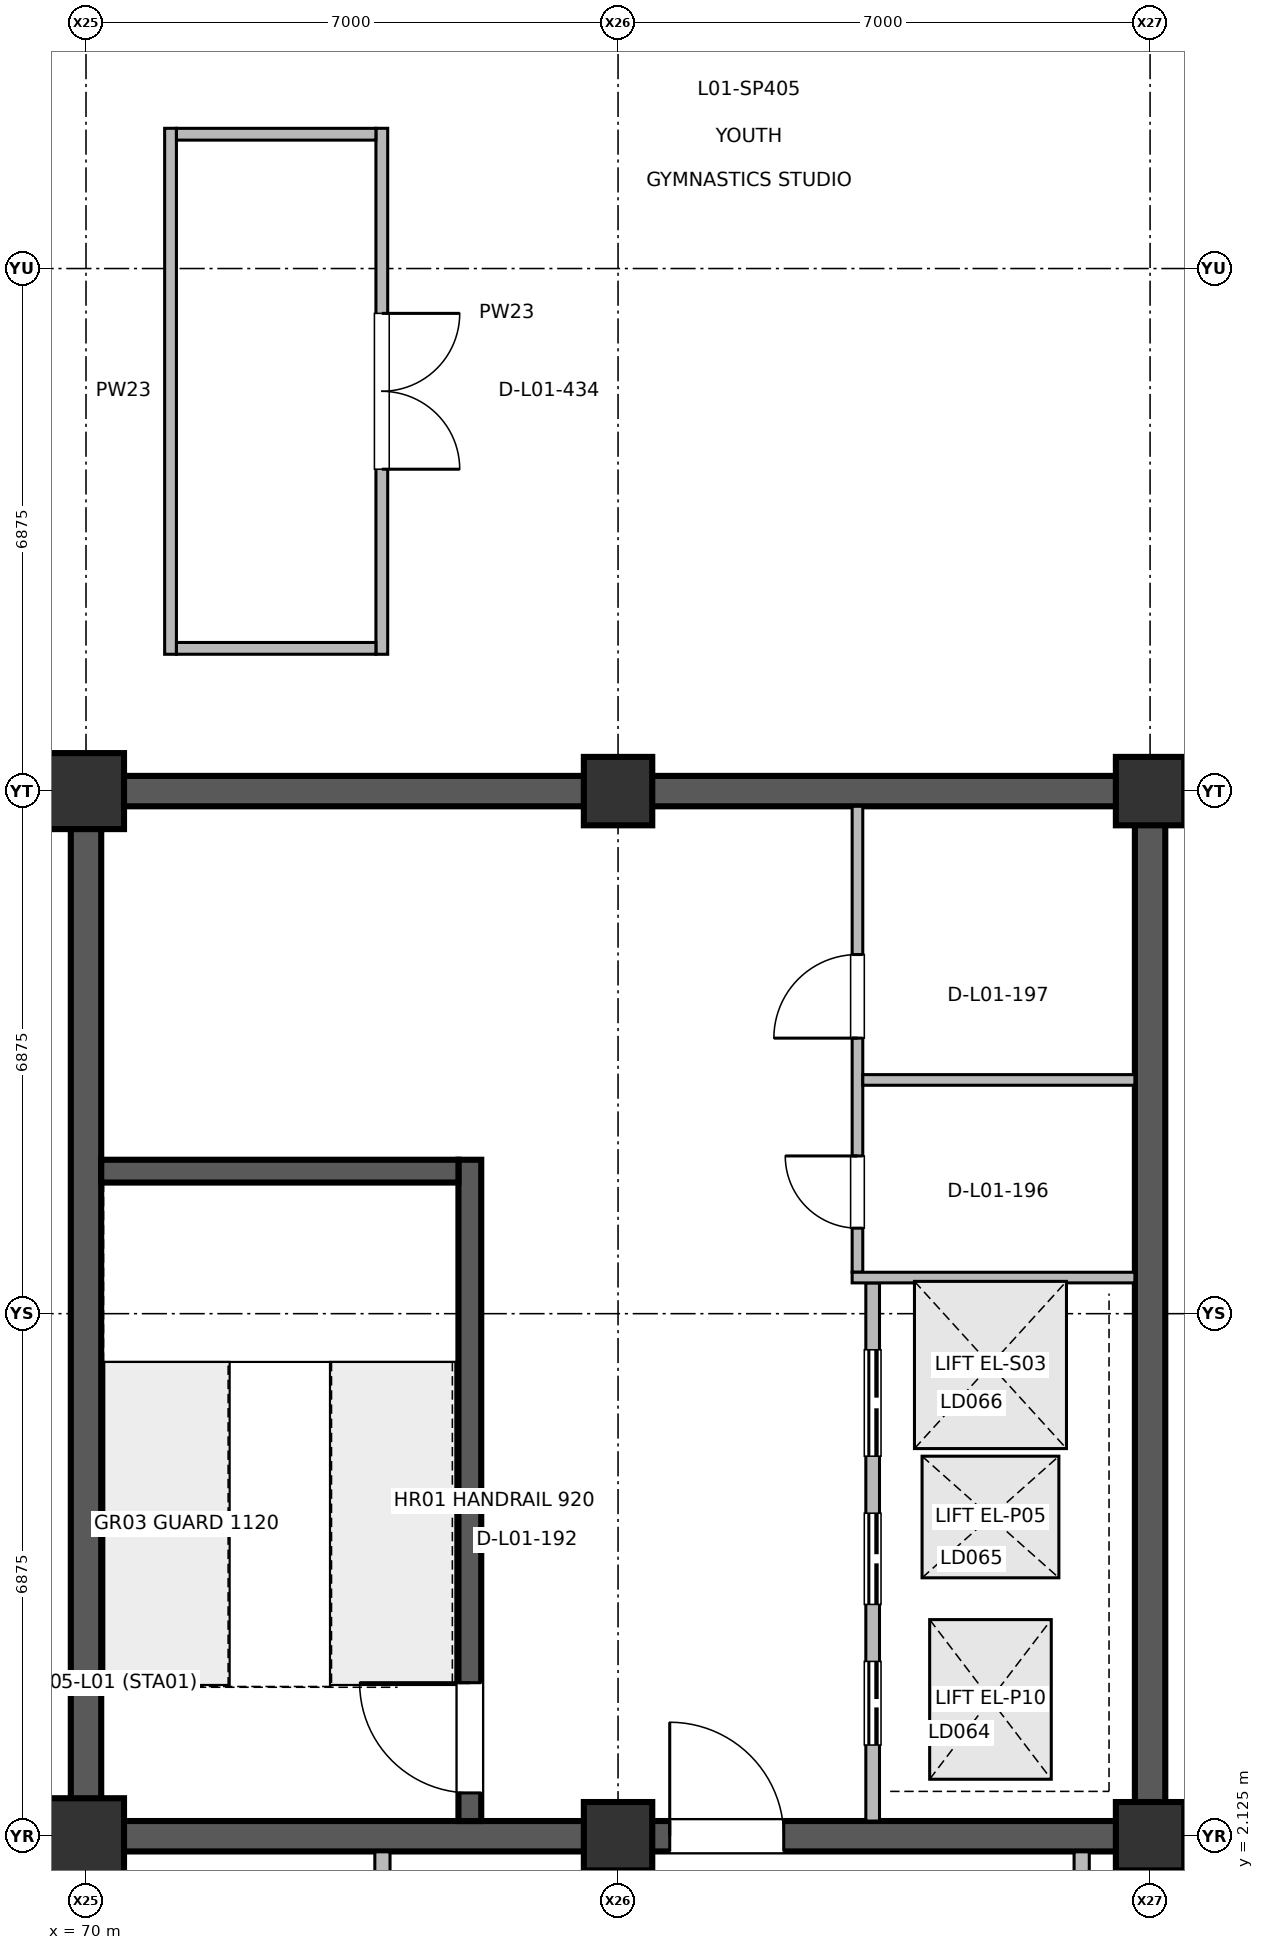
"""IFC4 building model, lengths in metres.
Left out: names, types, materials, properties, quantities, classifications, styles, units other than length and angle.
Written with IfcOpenShell. Run it as: python <this file> out.ifc"""

import sys

from ifc_helpers import new_model, si_unit, direction, frame, frame_2d, origin, origin_2d, place, context, subcontext, project, spatial, rectangle, extrude, element, fill, save


model = new_model("IFC4")
c1 = context("Model", 3, precision=1e-05, world=origin(), true_north=direction((0.0, 1.0)))
c2 = subcontext(c1, "Body", "Model", "MODEL_VIEW")
j1 = project(units=[si_unit("LENGTHUNIT", "METRE"), si_unit("PLANEANGLEUNIT", "RADIAN")], contexts=[c1])
p1 = place(None, origin())
s1 = spatial("IfcSite", under=j1, at=p1, CompositionType="ELEMENT")
p2 = place(p1, origin())
s2 = spatial("IfcBuilding", under=s1, at=p2, CompositionType="ELEMENT")
p3 = place(p2, origin())
s3 = spatial("IfcBuildingStorey", under=s2, at=p3, CompositionType="ELEMENT", Elevation=0.0)
for number, where, z_axis, x_axis in (
    (1, (70.0, 2.125, 0.0), (0.0, 0.0, 1.0), (1.0, 0.0, 0.0)),
    (2, (70.0, 15.875, 0.0), (0.0, 0.0, 1.0), (1.0, 0.0, 0.0)),
):
    element("IfcColumn", number, at=place(p3, frame(where, z_axis=z_axis, x_axis=x_axis)), inside=s3, PredefinedType="COLUMN", context=c2, shape_type="SweptSolid", body=[
        extrude(rectangle(XDim=1.0, YDim=1.0, at=origin_2d()), origin(), (0.0, 0.0, 1.0), 5.998),
    ])
for number, where, z_axis, x_axis in (
    (3, (77.0, 2.125, 0.0), (0.0, 0.0, 1.0), (1.0, 0.0, 0.0)),
    (4, (77.0, 15.875, 0.0), (0.0, 0.0, 1.0), (1.0, 0.0, 0.0)),
    (5, (84.0, 2.125, 0.0), (0.0, 0.0, 1.0), (1.0, 0.0, 0.0)),
    (6, (84.0, 15.875, 0.0), (0.0, 0.0, 1.0), (1.0, 0.0, 0.0)),
):
    element("IfcColumn", number, at=place(p3, frame(where, z_axis=z_axis, x_axis=x_axis)), inside=s3, PredefinedType="COLUMN", context=c2, shape_type="SweptSolid", body=[
        extrude(rectangle(XDim=0.9, YDim=0.9, at=origin_2d()), origin(), (0.0, 0.0, 1.0), 5.998),
    ])
for number, where, z_axis, x_axis in (
    (7, (70.0, 2.325, 0.0), (0.0, 0.0, 1.0), (0.0, 1.0, 0.0)),
    (8, (84.0, 2.325, 0.0), (0.0, 0.0, 1.0), (0.0, 1.0, 0.0)),
):
    element("IfcWall", number, at=place(p3, frame(where, z_axis=z_axis, x_axis=x_axis)), inside=s3, PredefinedType="SHEAR", context=c2, shape_type="SweptSolid", body=[
        extrude(rectangle(XDim=13.35, YDim=0.4, at=frame_2d((6.675, 0.0))), origin(), (0.0, 0.0, 1.0), 5.75),
    ])
p4 = place(p3, frame((70.2, 2.125, 0.0), z_axis=(0.0, 0.0, 1.0), x_axis=(1.0, 0.0, 0.0)))
e9 = element("IfcWall", 9, at=p4, inside=s3, PredefinedType="SHEAR", context=c2, shape_type="SweptSolid", body=[
    extrude(rectangle(XDim=13.6, YDim=0.4, at=frame_2d((6.8, 0.0))), origin(), (0.0, 0.0, 1.0), 5.75),
])
p5 = place(p4, frame((7.48, 0.0, 0.0)))
e10 = element("IfcOpeningElement", 10, at=p5, cuts=e9, PredefinedType="OPENING", context=c2, shape_type="SweptSolid", body=[
    extrude(rectangle(XDim=1.5, YDim=2.2, at=frame_2d((0.75, 1.1))), frame((0.0, 0.21, 0.0), z_axis=(0.0, -1.0, 0.0), x_axis=(1.0, 0.0, 0.0)), (0.0, 0.0, 1.0), 0.42),
])
p6 = place(p3, frame((70.2, 15.875, 0.0), z_axis=(0.0, 0.0, 1.0), x_axis=(1.0, 0.0, 0.0)))
e11 = element("IfcWall", 11, at=p6, inside=s3, PredefinedType="SHEAR", context=c2, shape_type="SweptSolid", body=[
    extrude(rectangle(XDim=13.6, YDim=0.4, at=frame_2d((6.8, 0.0))), origin(), (0.0, 0.0, 1.0), 5.75),
])
p7 = place(p3, frame((75.05, 2.325, 0.0), z_axis=(0.0, 0.0, 1.0), x_axis=(0.0, 1.0, 0.0)))
e12 = element("IfcWall", 12, at=p7, inside=s3, PredefinedType="SHEAR", context=c2, shape_type="SweptSolid", body=[
    extrude(rectangle(XDim=8.7, YDim=0.3, at=frame_2d((4.35, 0.0))), origin(), (0.0, 0.0, 1.0), 5.75),
])
p8 = place(p7, frame((0.37, 0.0, 0.0)))
e13 = element("IfcOpeningElement", 13, at=p8, cuts=e12, PredefinedType="OPENING", context=c2, shape_type="SweptSolid", body=[
    extrude(rectangle(XDim=1.45, YDim=2.2, at=frame_2d((0.725, 1.1))), frame((0.0, 0.16, 0.0), z_axis=(0.0, -1.0, 0.0), x_axis=(1.0, 0.0, 0.0)), (0.0, 0.0, 1.0), 0.32),
])
p9 = place(p3, frame((80.35, 2.325, 0.0), z_axis=(0.0, 0.0, 1.0), x_axis=(0.0, 1.0, 0.0)))
e14 = element("IfcWall", 14, at=p9, inside=s3, PredefinedType="PARTITIONING", context=c2, shape_type="SweptSolid", body=[
    extrude(rectangle(XDim=7.08, YDim=0.18, at=frame_2d((3.54, 0.0))), origin(), (0.0, 0.0, 1.0), 5.02),
])
p10 = place(p9, frame((1.0, 0.0, 0.0)))
e15 = element("IfcOpeningElement", 15, at=p10, cuts=e14, PredefinedType="OPENING", context=c2, shape_type="SweptSolid", body=[
    extrude(rectangle(XDim=1.1, YDim=2.2, at=frame_2d((0.55, 1.1))), frame((0.0, 0.1, 0.0), z_axis=(0.0, -1.0, 0.0), x_axis=(1.0, 0.0, 0.0)), (0.0, 0.0, 1.0), 0.2),
])
p11 = place(p9, frame((2.85, 0.0, 0.0)))
e16 = element("IfcOpeningElement", 16, at=p11, cuts=e14, PredefinedType="OPENING", context=c2, shape_type="SweptSolid", body=[
    extrude(rectangle(XDim=1.2, YDim=2.25, at=frame_2d((0.6, 1.125))), frame((0.0, 0.1, 0.0), z_axis=(0.0, -1.0, 0.0), x_axis=(1.0, 0.0, 0.0)), (0.0, 0.0, 1.0), 0.2),
])
p12 = place(p9, frame((4.8, 0.0, 0.0)))
e17 = element("IfcOpeningElement", 17, at=p12, cuts=e14, PredefinedType="OPENING", context=c2, shape_type="SweptSolid", body=[
    extrude(rectangle(XDim=1.4, YDim=2.3, at=frame_2d((0.7, 1.15))), frame((0.0, 0.1, 0.0), z_axis=(0.0, -1.0, 0.0), x_axis=(1.0, 0.0, 0.0)), (0.0, 0.0, 1.0), 0.2),
])
p13 = place(p3, frame((80.15, 9.545, 0.0), z_axis=(0.0, 0.0, 1.0), x_axis=(0.0, 1.0, 0.0)))
e18 = element("IfcWall", 18, at=p13, inside=s3, PredefinedType="PARTITIONING", context=c2, shape_type="SweptSolid", body=[
    extrude(rectangle(XDim=6.13, YDim=0.14, at=frame_2d((3.065, 0.0))), origin(), (0.0, 0.0, 1.0), 5.02),
])
p14 = place(p13, frame((0.58, 0.0, 0.0)))
e19 = element("IfcOpeningElement", 19, at=p14, cuts=e18, PredefinedType="OPENING", context=c2, shape_type="SweptSolid", body=[
    extrude(rectangle(XDim=0.95, YDim=2.15, at=frame_2d((0.475, 1.075))), frame((0.0, 0.08, 0.0), z_axis=(0.0, -1.0, 0.0), x_axis=(1.0, 0.0, 0.0)), (0.0, 0.0, 1.0), 0.16),
])
p15 = place(p13, frame((3.08, 0.0, 0.0)))
e20 = element("IfcOpeningElement", 20, at=p15, cuts=e18, PredefinedType="OPENING", context=c2, shape_type="SweptSolid", body=[
    extrude(rectangle(XDim=1.1, YDim=2.15, at=frame_2d((0.55, 1.075))), frame((0.0, 0.08, 0.0), z_axis=(0.0, -1.0, 0.0), x_axis=(1.0, 0.0, 0.0)), (0.0, 0.0, 1.0), 0.16),
])
p16 = place(p3, frame((73.892, 24.595, 0.0), z_axis=(0.0, 0.0, 1.0), x_axis=(0.0, -1.0, 0.0)))
e21 = element("IfcWall", 21, at=p16, inside=s3, PredefinedType="PARTITIONING", context=c2, shape_type="SweptSolid", body=[
    extrude(rectangle(XDim=6.92, YDim=0.155, at=frame_2d((3.46, 0.0))), origin(), (0.0, 0.0, 1.0), 5.02),
])
p17 = place(p16, frame((2.435, 0.0, 0.0)))
e22 = element("IfcOpeningElement", 22, at=p17, cuts=e21, PredefinedType="OPENING", context=c2, shape_type="SweptSolid", body=[
    extrude(rectangle(XDim=2.05, YDim=2.4, at=frame_2d((1.025, 1.2))), frame((0.0, 0.087, 0.0), z_axis=(0.0, -1.0, 0.0), x_axis=(1.0, 0.0, 0.0)), (0.0, 0.0, 1.0), 0.175),
])
p18 = place(p3, frame((83.1, 0.65, 0.0), z_axis=(0.0, 0.0, 1.0), x_axis=(0.0, 1.0, 0.0)))
e23 = element("IfcWall", 23, at=p18, inside=s3, PredefinedType="PARTITIONING", context=c2, shape_type="SweptSolid", body=[
    extrude(rectangle(XDim=1.27, YDim=0.2, at=frame_2d((0.635, 0.0))), origin(), (0.0, 0.0, 1.0), 5.02),
])
p19 = place(p3, frame((73.9, -1.95, 0.0), z_axis=(0.0, 0.0, 1.0), x_axis=(0.0, 1.0, 0.0)))
e24 = element("IfcWall", 24, at=p19, inside=s3, PredefinedType="PARTITIONING", context=c2, shape_type="SweptSolid", body=[
    extrude(rectangle(XDim=3.87, YDim=0.2, at=frame_2d((1.935, 0.0))), origin(), (0.0, 0.0, 1.0), 5.02),
])
p20 = place(p3, frame((80.08, 9.475, 0.0), z_axis=(0.0, 0.0, 1.0), x_axis=(1.0, 0.0, 0.0)))
e25 = element("IfcWall", 25, at=p20, inside=s3, PredefinedType="PARTITIONING", context=c2, shape_type="SweptSolid", body=[
    extrude(rectangle(XDim=3.72, YDim=0.14, at=frame_2d((1.86, 0.0))), origin(), (0.0, 0.0, 1.0), 5.02),
])
p21 = place(p3, frame((80.22, 12.075, 0.0), z_axis=(0.0, 0.0, 1.0), x_axis=(1.0, 0.0, 0.0)))
e26 = element("IfcWall", 26, at=p21, inside=s3, PredefinedType="PARTITIONING", context=c2, shape_type="SweptSolid", body=[
    extrude(rectangle(XDim=3.58, YDim=0.14, at=frame_2d((1.79, 0.0))), origin(), (0.0, 0.0, 1.0), 5.02),
])
p22 = place(p3, frame((71.112, 17.675, 0.0), z_axis=(0.0, 0.0, 1.0), x_axis=(0.0, 1.0, 0.0)))
e27 = element("IfcWall", 27, at=p22, inside=s3, PredefinedType="PARTITIONING", context=c2, shape_type="SweptSolid", body=[
    extrude(rectangle(XDim=6.92, YDim=0.155, at=frame_2d((3.46, 0.0))), origin(), (0.0, 0.0, 1.0), 5.02),
])
for number, where, z_axis, x_axis in (
    (28, (71.19, 17.753, 0.0), (0.0, 0.0, 1.0), (1.0, 0.0, 0.0)),
    (29, (71.19, 24.517, 0.0), (0.0, 0.0, 1.0), (1.0, 0.0, 0.0)),
):
    element("IfcWall", number, at=place(p3, frame(where, z_axis=z_axis, x_axis=x_axis)), inside=s3, PredefinedType="PARTITIONING", context=c2, shape_type="SweptSolid", body=[
        extrude(rectangle(XDim=2.624, YDim=0.155, at=frame_2d((1.312, 0.0))), origin(), (0.0, 0.0, 1.0), 5.02),
    ])
p23 = place(p3, frame((70.2, 10.875, 0.0), z_axis=(0.0, 0.0, 1.0), x_axis=(1.0, 0.0, 0.0)))
e30 = element("IfcWall", 30, at=p23, inside=s3, PredefinedType="SHEAR", context=c2, shape_type="SweptSolid", body=[
    extrude(rectangle(XDim=4.7, YDim=0.3, at=frame_2d((2.35, 0.0))), origin(), (0.0, 0.0, 1.0), 5.75),
])
p24 = place(p5, origin())
e31 = element("IfcDoor", 31, at=p24, inside=s3, OperationType="SINGLE_SWING_LEFT", PredefinedType="DOOR", context=c2, shape_type="SweptSolid", body=[
    extrude(rectangle(XDim=1.5, YDim=2.2, at=frame_2d((0.75, 1.1))), frame((0.0, 0.025, 0.0), z_axis=(0.0, -1.0, 0.0), x_axis=(1.0, 0.0, 0.0)), (0.0, 0.0, 1.0), 0.05),
])
fill(e10, e31)
p25 = place(p8, origin())
e32 = element("IfcDoor", 32, at=p25, inside=s3, OperationType="SINGLE_SWING_RIGHT", PredefinedType="DOOR", context=c2, shape_type="SweptSolid", body=[
    extrude(rectangle(XDim=1.45, YDim=2.2, at=frame_2d((0.725, 1.1))), frame((0.0, 0.025, 0.0), z_axis=(0.0, -1.0, 0.0), x_axis=(1.0, 0.0, 0.0)), (0.0, 0.0, 1.0), 0.05),
])
fill(e13, e32)
p26 = place(p10, origin())
e33 = element("IfcDoor", 33, at=p26, inside=s3, OperationType="DOUBLE_DOOR_SLIDING", PredefinedType="DOOR", context=c2, shape_type="SweptSolid", body=[
    extrude(rectangle(XDim=1.1, YDim=2.2, at=frame_2d((0.55, 1.1))), frame((0.0, 0.025, 0.0), z_axis=(0.0, -1.0, 0.0), x_axis=(1.0, 0.0, 0.0)), (0.0, 0.0, 1.0), 0.05),
])
fill(e15, e33)
p27 = place(p11, origin())
e34 = element("IfcDoor", 34, at=p27, inside=s3, OperationType="DOUBLE_DOOR_SLIDING", PredefinedType="DOOR", context=c2, shape_type="SweptSolid", body=[
    extrude(rectangle(XDim=1.2, YDim=2.25, at=frame_2d((0.6, 1.125))), frame((0.0, 0.025, 0.0), z_axis=(0.0, -1.0, 0.0), x_axis=(1.0, 0.0, 0.0)), (0.0, 0.0, 1.0), 0.05),
])
fill(e16, e34)
p28 = place(p12, origin())
e35 = element("IfcDoor", 35, at=p28, inside=s3, OperationType="DOUBLE_DOOR_SLIDING", PredefinedType="DOOR", context=c2, shape_type="SweptSolid", body=[
    extrude(rectangle(XDim=1.4, YDim=2.3, at=frame_2d((0.7, 1.15))), frame((0.0, 0.025, 0.0), z_axis=(0.0, -1.0, 0.0), x_axis=(1.0, 0.0, 0.0)), (0.0, 0.0, 1.0), 0.05),
])
fill(e17, e35)
p29 = place(p14, origin())
e36 = element("IfcDoor", 36, at=p29, inside=s3, OperationType="SINGLE_SWING_RIGHT", PredefinedType="DOOR", context=c2, shape_type="SweptSolid", body=[
    extrude(rectangle(XDim=0.95, YDim=2.15, at=frame_2d((0.475, 1.075))), frame((0.0, 0.025, 0.0), z_axis=(0.0, -1.0, 0.0), x_axis=(1.0, 0.0, 0.0)), (0.0, 0.0, 1.0), 0.05),
])
fill(e19, e36)
p30 = place(p15, origin())
e37 = element("IfcDoor", 37, at=p30, inside=s3, OperationType="SINGLE_SWING_LEFT", PredefinedType="DOOR", context=c2, shape_type="SweptSolid", body=[
    extrude(rectangle(XDim=1.1, YDim=2.15, at=frame_2d((0.55, 1.075))), frame((0.0, 0.025, 0.0), z_axis=(0.0, -1.0, 0.0), x_axis=(1.0, 0.0, 0.0)), (0.0, 0.0, 1.0), 0.05),
])
fill(e20, e37)
p31 = place(p17, origin())
e38 = element("IfcDoor", 38, at=p31, inside=s3, OperationType="DOUBLE_DOOR_SINGLE_SWING", PredefinedType="DOOR", context=c2, shape_type="SweptSolid", body=[
    extrude(rectangle(XDim=2.05, YDim=2.4, at=frame_2d((1.025, 1.2))), frame((0.0, 0.025, 0.0), z_axis=(0.0, -1.0, 0.0), x_axis=(1.0, 0.0, 0.0)), (0.0, 0.0, 1.0), 0.05),
])
fill(e22, e38)
save(model, sys.argv[1])
